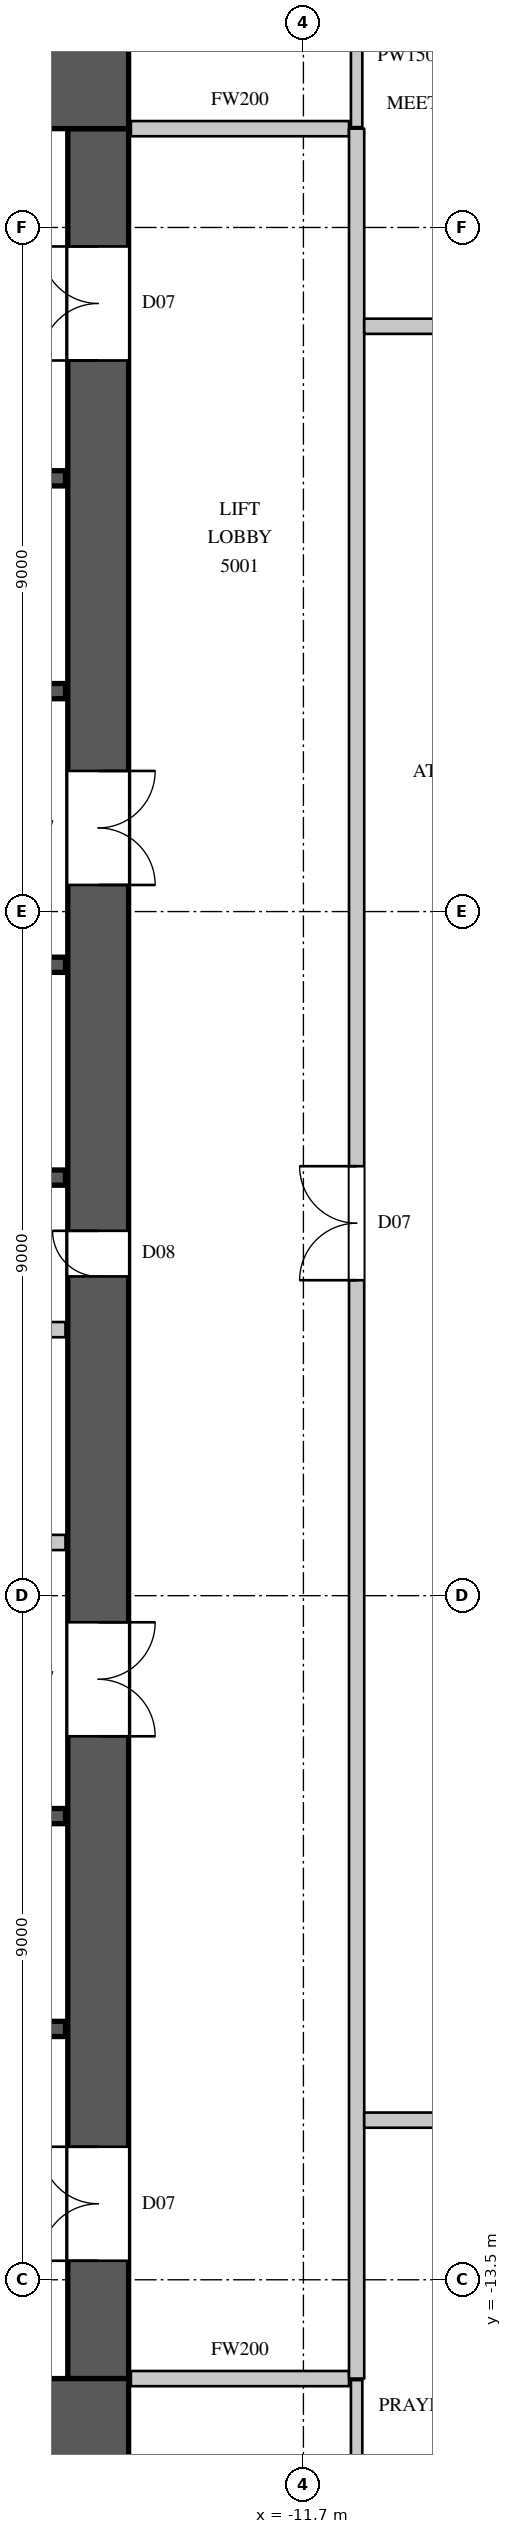
"""IFC4 building model, lengths in metres.
Left out: names, types, materials, properties, quantities, classifications, styles, units other than length and angle.
Written with IfcOpenShell. Run it as: python <this file> out.ifc"""

import sys

from ifc_helpers import new_model, si_unit, direction, frame, frame_2d, origin, place, context, subcontext, project, spatial, rectangle, extrude, element, fill, save


model = new_model("IFC4")
c1 = context("Model", 3, precision=1e-05, world=origin(), true_north=direction((0.0, 1.0)))
c2 = subcontext(c1, "Body", "Model", "MODEL_VIEW")
j1 = project(units=[si_unit("LENGTHUNIT", "METRE"), si_unit("PLANEANGLEUNIT", "RADIAN")], contexts=[c1])
p1 = place(None, origin())
s1 = spatial("IfcSite", under=j1, at=p1, CompositionType="ELEMENT")
p2 = place(p1, origin())
s2 = spatial("IfcBuilding", under=s1, at=p2, CompositionType="ELEMENT")
p3 = place(p2, frame((0.0, 0.0, 226.1)))
s3 = spatial("IfcBuildingStorey", under=s2, at=p3, CompositionType="ELEMENT", Elevation=226.1)
for number, where, z_axis, x_axis in (
    (1, (-30.0, 15.4, 0.0), (0.0, 0.0, 1.0), (1.0, 0.0, 0.0)),
    (2, (-30.0, -15.4, 0.0), (0.0, 0.0, 1.0), (1.0, 0.0, 0.0)),
):
    element("IfcWall", number, at=place(p3, frame(where, z_axis=z_axis, x_axis=x_axis)), inside=s3, PredefinedType="SHEAR", context=c2, shape_type="SweptSolid", body=[
        extrude(rectangle(XDim=16.0, YDim=1.2, at=frame_2d((8.0, 0.0))), origin(), (0.0, 0.0, 1.0), 4.1),
    ])
p4 = place(p3, frame((-14.4, -14.8, 0.0), z_axis=(0.0, 0.0, 1.0), x_axis=(0.0, 1.0, 0.0)))
e3 = element("IfcWall", 3, at=p4, inside=s3, PredefinedType="SHEAR", context=c2, shape_type="SweptSolid", body=[
    extrude(rectangle(XDim=29.6, YDim=0.8, at=frame_2d((14.8, 0.0))), origin(), (0.0, 0.0, 1.0), 4.1),
])
p5 = place(p4, frame((1.55, 0.0, 0.0)))
e4 = element("IfcOpeningElement", 4, at=p5, cuts=e3, PredefinedType="OPENING", context=c2, shape_type="SweptSolid", body=[
    extrude(rectangle(XDim=1.5, YDim=2.4, at=frame_2d((0.75, 1.2))), frame((0.0, 0.41, 0.0), z_axis=(0.0, -1.0, 0.0), x_axis=(1.0, 0.0, 0.0)), (0.0, 0.0, 1.0), 0.82),
])
p6 = place(p4, frame((26.55, 0.0, 0.0)))
e5 = element("IfcOpeningElement", 5, at=p6, cuts=e3, PredefinedType="OPENING", context=c2, shape_type="SweptSolid", body=[
    extrude(rectangle(XDim=1.5, YDim=2.4, at=frame_2d((0.75, 1.2))), frame((0.0, 0.41, 0.0), z_axis=(0.0, -1.0, 0.0), x_axis=(1.0, 0.0, 0.0)), (0.0, 0.0, 1.0), 0.82),
])
p7 = place(p4, frame((8.45, 0.0, 0.0)))
e6 = element("IfcOpeningElement", 6, at=p7, cuts=e3, PredefinedType="OPENING", context=c2, shape_type="SweptSolid", body=[
    extrude(rectangle(XDim=1.5, YDim=2.4, at=frame_2d((0.75, 1.2))), frame((0.0, 0.41, 0.0), z_axis=(0.0, -1.0, 0.0), x_axis=(1.0, 0.0, 0.0)), (0.0, 0.0, 1.0), 0.82),
])
p8 = place(p4, frame((19.65, 0.0, 0.0)))
e7 = element("IfcOpeningElement", 7, at=p8, cuts=e3, PredefinedType="OPENING", context=c2, shape_type="SweptSolid", body=[
    extrude(rectangle(XDim=1.5, YDim=2.4, at=frame_2d((0.75, 1.2))), frame((0.0, 0.41, 0.0), z_axis=(0.0, -1.0, 0.0), x_axis=(1.0, 0.0, 0.0)), (0.0, 0.0, 1.0), 0.82),
])
p9 = place(p4, frame((14.5, 0.0, 0.0)))
e8 = element("IfcOpeningElement", 8, at=p9, cuts=e3, PredefinedType="OPENING", context=c2, shape_type="SweptSolid", body=[
    extrude(rectangle(XDim=0.6, YDim=2.0, at=frame_2d((0.3, 1.0))), frame((0.0, 0.41, 0.0), z_axis=(0.0, -1.0, 0.0), x_axis=(1.0, 0.0, 0.0)), (0.0, 0.0, 1.0), 0.82),
])
p10 = place(p3, frame((-29.17, -3.8, 0.0), z_axis=(0.0, 0.0, 1.0), x_axis=(1.0, 0.0, 0.0)))
e9 = element("IfcWall", 9, at=p10, inside=s3, PredefinedType="PARTITIONING", context=c2, shape_type="SweptSolid", body=[
    extrude(rectangle(XDim=14.34, YDim=0.2, at=frame_2d((7.17, 0.0))), origin(), (0.0, 0.0, 1.0), 3.8),
])
p11 = place(p10, frame((6.7, 0.0, 0.0)))
e10 = element("IfcOpeningElement", 10, at=p11, cuts=e9, PredefinedType="OPENING", context=c2, shape_type="SweptSolid", body=[
    extrude(rectangle(XDim=0.9, YDim=2.2, at=frame_2d((0.45, 1.1))), frame((0.0, 0.11, 0.0), z_axis=(0.0, -1.0, 0.0), x_axis=(1.0, 0.0, 0.0)), (0.0, 0.0, 1.0), 0.22),
])
for number, where, z_axis, x_axis in (
    (11, (-13.97, -14.8, 0.0), (0.0, 0.0, 1.0), (1.0, 0.0, 0.0)),
    (12, (-13.97, 14.8, 0.0), (0.0, 0.0, 1.0), (1.0, 0.0, 0.0)),
):
    element("IfcWall", number, at=place(p3, frame(where, z_axis=z_axis, x_axis=x_axis)), inside=s3, PredefinedType="PARTITIONING", context=c2, shape_type="SweptSolid", body=[
        extrude(rectangle(XDim=2.87, YDim=0.2, at=frame_2d((1.435, 0.0))), origin(), (0.0, 0.0, 1.0), 3.8),
    ])
p12 = place(p3, frame((-11.0, -14.8, 0.0), z_axis=(0.0, 0.0, 1.0), x_axis=(0.0, 1.0, 0.0)))
e13 = element("IfcWall", 13, at=p12, inside=s3, PredefinedType="PARTITIONING", context=c2, shape_type="SweptSolid", body=[
    extrude(rectangle(XDim=29.6, YDim=0.2, at=frame_2d((14.8, 0.0))), origin(), (0.0, 0.0, 1.0), 3.8),
])
p13 = place(p12, frame((14.45, 0.0, 0.0)))
e14 = element("IfcOpeningElement", 14, at=p13, cuts=e13, PredefinedType="OPENING", context=c2, shape_type="SweptSolid", body=[
    extrude(rectangle(XDim=1.5, YDim=2.4, at=frame_2d((0.75, 1.2))), frame((0.0, 0.11, 0.0), z_axis=(0.0, -1.0, 0.0), x_axis=(1.0, 0.0, 0.0)), (0.0, 0.0, 1.0), 0.22),
])
p14 = place(p3, frame((-10.9, -11.4, 0.0), z_axis=(0.0, 0.0, 1.0), x_axis=(1.0, 0.0, 0.0)))
e15 = element("IfcWall", 15, at=p14, inside=s3, PredefinedType="PARTITIONING", context=c2, shape_type="SweptSolid", body=[
    extrude(rectangle(XDim=21.2, YDim=0.2, at=frame_2d((10.6, 0.0))), origin(), (0.0, 0.0, 1.0), 3.8),
])
p15 = place(p14, frame((0.95, 0.0, 0.0)))
e16 = element("IfcOpeningElement", 16, at=p15, cuts=e15, PredefinedType="OPENING", context=c2, shape_type="SweptSolid", body=[
    extrude(rectangle(XDim=0.95, YDim=2.2, at=frame_2d((0.475, 1.1))), frame((0.0, 0.11, 0.0), z_axis=(0.0, -1.0, 0.0), x_axis=(1.0, 0.0, 0.0)), (0.0, 0.0, 1.0), 0.22),
])
p16 = place(p14, frame((4.2, 0.0, 0.0)))
e17 = element("IfcOpeningElement", 17, at=p16, cuts=e15, PredefinedType="OPENING", context=c2, shape_type="SweptSolid", body=[
    extrude(rectangle(XDim=0.9, YDim=2.2, at=frame_2d((0.45, 1.1))), frame((0.0, 0.11, 0.0), z_axis=(0.0, -1.0, 0.0), x_axis=(1.0, 0.0, 0.0)), (0.0, 0.0, 1.0), 0.22),
])
p17 = place(p14, frame((8.35, 0.0, 0.0)))
e18 = element("IfcOpeningElement", 18, at=p17, cuts=e15, PredefinedType="OPENING", context=c2, shape_type="SweptSolid", body=[
    extrude(rectangle(XDim=1.1, YDim=2.4, at=frame_2d((0.55, 1.2))), frame((0.0, 0.11, 0.0), z_axis=(0.0, -1.0, 0.0), x_axis=(1.0, 0.0, 0.0)), (0.0, 0.0, 1.0), 0.22),
])
p18 = place(p14, frame((18.0, 0.0, 0.0)))
e19 = element("IfcOpeningElement", 19, at=p18, cuts=e15, PredefinedType="OPENING", context=c2, shape_type="SweptSolid", body=[
    extrude(rectangle(XDim=1.1, YDim=2.4, at=frame_2d((0.55, 1.2))), frame((0.0, 0.11, 0.0), z_axis=(0.0, -1.0, 0.0), x_axis=(1.0, 0.0, 0.0)), (0.0, 0.0, 1.0), 0.22),
])
p19 = place(p3, frame((-10.9, 12.2, 0.0), z_axis=(0.0, 0.0, 1.0), x_axis=(1.0, 0.0, 0.0)))
e20 = element("IfcWall", 20, at=p19, inside=s3, PredefinedType="PARTITIONING", context=c2, shape_type="SweptSolid", body=[
    extrude(rectangle(XDim=3.704, YDim=0.2, at=frame_2d((1.852, 0.0))), origin(), (0.0, 0.0, 1.0), 3.8),
])
p20 = place(p19, frame((1.7, 0.0, 0.0)))
e21 = element("IfcOpeningElement", 21, at=p20, cuts=e20, PredefinedType="OPENING", context=c2, shape_type="SweptSolid", body=[
    extrude(rectangle(XDim=1.1, YDim=2.4, at=frame_2d((0.55, 1.2))), frame((0.0, 0.11, 0.0), z_axis=(0.0, -1.0, 0.0), x_axis=(1.0, 0.0, 0.0)), (0.0, 0.0, 1.0), 0.22),
])
for number, where, z_axis, x_axis in (
    (22, (-11.0, -16.7, 0.0), (0.0, 0.0, 1.0), (0.0, 1.0, 0.0)),
    (23, (-11.0, 14.82, 0.0), (0.0, 0.0, 1.0), (0.0, 1.0, 0.0)),
):
    element("IfcWall", number, at=place(p3, frame(where, z_axis=z_axis, x_axis=x_axis)), inside=s3, PredefinedType="PARTITIONING", context=c2, shape_type="SweptSolid", body=[
        extrude(rectangle(XDim=1.88, YDim=0.15, at=frame_2d((0.94, 0.0))), origin(), (0.0, 0.0, 1.0), 3.8),
    ])
p21 = place(p3, frame((-29.17, -1.0, 0.0), z_axis=(0.0, 0.0, 1.0), x_axis=(1.0, 0.0, 0.0)))
e24 = element("IfcWall", 24, at=p21, inside=s3, PredefinedType="PARTITIONING", context=c2, shape_type="SweptSolid", body=[
    extrude(rectangle(XDim=14.34, YDim=0.2, at=frame_2d((7.17, 0.0))), origin(), (0.0, 0.0, 1.0), 3.8),
])
p22 = place(p3, frame((-26.08, 1.0, 0.0), z_axis=(0.0, 0.0, 1.0), x_axis=(1.0, 0.0, 0.0)))
e25 = element("IfcWall", 25, at=p22, inside=s3, PredefinedType="SHEAR", context=c2, shape_type="SweptSolid", body=[
    extrude(rectangle(XDim=11.25, YDim=0.2, at=frame_2d((5.625, 0.0))), origin(), (0.0, 0.0, 1.0), 3.8),
])
p23 = place(p3, frame((-26.08, 3.8, 0.0), z_axis=(0.0, 0.0, 1.0), x_axis=(1.0, 0.0, 0.0)))
e26 = element("IfcWall", 26, at=p23, inside=s3, PredefinedType="SHEAR", context=c2, shape_type="SweptSolid", body=[
    extrude(rectangle(XDim=11.25, YDim=0.2, at=frame_2d((5.625, 0.0))), origin(), (0.0, 0.0, 1.0), 3.8),
])
p24 = place(p23, frame((0.8, 0.0, 0.0)))
e27 = element("IfcOpeningElement", 27, at=p24, cuts=e26, PredefinedType="OPENING", context=c2, shape_type="SweptSolid", body=[
    extrude(rectangle(XDim=1.1, YDim=2.2, at=frame_2d((0.55, 1.1))), frame((0.0, 0.11, 0.0), z_axis=(0.0, -1.0, 0.0), x_axis=(1.0, 0.0, 0.0)), (0.0, 0.0, 1.0), 0.22),
])
p25 = place(p23, frame((3.55, 0.0, 0.0)))
e28 = element("IfcOpeningElement", 28, at=p25, cuts=e26, PredefinedType="OPENING", context=c2, shape_type="SweptSolid", body=[
    extrude(rectangle(XDim=1.1, YDim=2.2, at=frame_2d((0.55, 1.1))), frame((0.0, 0.11, 0.0), z_axis=(0.0, -1.0, 0.0), x_axis=(1.0, 0.0, 0.0)), (0.0, 0.0, 1.0), 0.22),
])
p26 = place(p23, frame((6.25, 0.0, 0.0)))
e29 = element("IfcOpeningElement", 29, at=p26, cuts=e26, PredefinedType="OPENING", context=c2, shape_type="SweptSolid", body=[
    extrude(rectangle(XDim=1.1, YDim=2.2, at=frame_2d((0.55, 1.1))), frame((0.0, 0.11, 0.0), z_axis=(0.0, -1.0, 0.0), x_axis=(1.0, 0.0, 0.0)), (0.0, 0.0, 1.0), 0.22),
])
p27 = place(p23, frame((9.15, 0.0, 0.0)))
e30 = element("IfcOpeningElement", 30, at=p27, cuts=e26, PredefinedType="OPENING", context=c2, shape_type="SweptSolid", body=[
    extrude(rectangle(XDim=1.1, YDim=2.2, at=frame_2d((0.55, 1.1))), frame((0.0, 0.11, 0.0), z_axis=(0.0, -1.0, 0.0), x_axis=(1.0, 0.0, 0.0)), (0.0, 0.0, 1.0), 0.22),
])
p28 = place(p3, frame((-17.92, -10.2, 0.0), z_axis=(0.0, 0.0, 1.0), x_axis=(1.0, 0.0, 0.0)))
e31 = element("IfcWall", 31, at=p28, inside=s3, PredefinedType="SHEAR", context=c2, shape_type="SweptSolid", body=[
    extrude(rectangle(XDim=3.09, YDim=0.2, at=frame_2d((1.545, 0.0))), origin(), (0.0, 0.0, 1.0), 3.8),
])
p29 = place(p28, frame((1.0, 0.0, 0.0)))
e32 = element("IfcOpeningElement", 32, at=p29, cuts=e31, PredefinedType="OPENING", context=c2, shape_type="SweptSolid", body=[
    extrude(rectangle(XDim=1.1, YDim=2.2, at=frame_2d((0.55, 1.1))), frame((0.0, 0.11, 0.0), z_axis=(0.0, -1.0, 0.0), x_axis=(1.0, 0.0, 0.0)), (0.0, 0.0, 1.0), 0.22),
])
p30 = place(p3, frame((-17.9, -7.4, 0.0), z_axis=(0.0, 0.0, 1.0), x_axis=(1.0, 0.0, 0.0)))
e33 = element("IfcWall", 33, at=p30, inside=s3, PredefinedType="SHEAR", context=c2, shape_type="SweptSolid", body=[
    extrude(rectangle(XDim=3.07, YDim=0.2, at=frame_2d((1.535, 0.0))), origin(), (0.0, 0.0, 1.0), 3.8),
])
p31 = place(p3, frame((-17.92, 7.4, 0.0), z_axis=(0.0, 0.0, 1.0), x_axis=(1.0, 0.0, 0.0)))
e34 = element("IfcWall", 34, at=p31, inside=s3, PredefinedType="SHEAR", context=c2, shape_type="SweptSolid", body=[
    extrude(rectangle(XDim=3.09, YDim=0.2, at=frame_2d((1.545, 0.0))), origin(), (0.0, 0.0, 1.0), 3.8),
])
p32 = place(p3, frame((-17.92, 10.2, 0.0), z_axis=(0.0, 0.0, 1.0), x_axis=(1.0, 0.0, 0.0)))
e35 = element("IfcWall", 35, at=p32, inside=s3, PredefinedType="SHEAR", context=c2, shape_type="SweptSolid", body=[
    extrude(rectangle(XDim=3.09, YDim=0.2, at=frame_2d((1.545, 0.0))), origin(), (0.0, 0.0, 1.0), 3.8),
])
p33 = place(p32, frame((1.0, 0.0, 0.0)))
e36 = element("IfcOpeningElement", 36, at=p33, cuts=e35, PredefinedType="OPENING", context=c2, shape_type="SweptSolid", body=[
    extrude(rectangle(XDim=1.1, YDim=2.2, at=frame_2d((0.55, 1.1))), frame((0.0, 0.11, 0.0), z_axis=(0.0, -1.0, 0.0), x_axis=(1.0, 0.0, 0.0)), (0.0, 0.0, 1.0), 0.22),
])
p34 = place(p13, origin())
e37 = element("IfcDoor", 37, at=p34, inside=s3, OperationType="DOUBLE_DOOR_SINGLE_SWING", PredefinedType="DOOR", context=c2, shape_type="SweptSolid", body=[
    extrude(rectangle(XDim=1.5, YDim=2.4, at=frame_2d((0.75, 1.2))), frame((0.0, 0.025, 0.0), z_axis=(0.0, -1.0, 0.0), x_axis=(1.0, 0.0, 0.0)), (0.0, 0.0, 1.0), 0.05),
])
fill(e14, e37)
p35 = place(p5, origin())
e38 = element("IfcDoor", 38, at=p35, inside=s3, OperationType="DOUBLE_DOOR_SINGLE_SWING", PredefinedType="DOOR", context=c2, shape_type="SweptSolid", body=[
    extrude(rectangle(XDim=1.5, YDim=2.4, at=frame_2d((0.75, 1.2))), frame((0.0, 0.395, 0.0), z_axis=(0.0, -1.0, 0.0), x_axis=(1.0, 0.0, 0.0)), (0.0, 0.0, 1.0), 0.05),
])
fill(e4, e38)
p36 = place(p6, origin())
e39 = element("IfcDoor", 39, at=p36, inside=s3, OperationType="DOUBLE_DOOR_SINGLE_SWING", PredefinedType="DOOR", context=c2, shape_type="SweptSolid", body=[
    extrude(rectangle(XDim=1.5, YDim=2.4, at=frame_2d((0.75, 1.2))), frame((0.0, 0.395, 0.0), z_axis=(0.0, -1.0, 0.0), x_axis=(1.0, 0.0, 0.0)), (0.0, 0.0, 1.0), 0.05),
])
fill(e5, e39)
p37 = place(p7, origin())
e40 = element("IfcDoor", 40, at=p37, inside=s3, OperationType="DOUBLE_DOOR_SINGLE_SWING", PredefinedType="DOOR", context=c2, shape_type="SweptSolid", body=[
    extrude(rectangle(XDim=1.5, YDim=2.4, at=frame_2d((0.75, 1.2))), frame((0.0, -0.345, 0.0), z_axis=(0.0, -1.0, 0.0), x_axis=(1.0, 0.0, 0.0)), (0.0, 0.0, 1.0), 0.05),
])
fill(e6, e40)
p38 = place(p8, origin())
e41 = element("IfcDoor", 41, at=p38, inside=s3, OperationType="DOUBLE_DOOR_SINGLE_SWING", PredefinedType="DOOR", context=c2, shape_type="SweptSolid", body=[
    extrude(rectangle(XDim=1.5, YDim=2.4, at=frame_2d((0.75, 1.2))), frame((0.0, -0.345, 0.0), z_axis=(0.0, -1.0, 0.0), x_axis=(1.0, 0.0, 0.0)), (0.0, 0.0, 1.0), 0.05),
])
fill(e7, e41)
p39 = place(p9, origin())
e42 = element("IfcDoor", 42, at=p39, inside=s3, OperationType="SINGLE_SWING_RIGHT", PredefinedType="DOOR", context=c2, shape_type="SweptSolid", body=[
    extrude(rectangle(XDim=0.6, YDim=2.0, at=frame_2d((0.3, 1.0))), frame((0.0, 0.395, 0.0), z_axis=(0.0, -1.0, 0.0), x_axis=(1.0, 0.0, 0.0)), (0.0, 0.0, 1.0), 0.05),
])
fill(e8, e42)
save(model, sys.argv[1])
